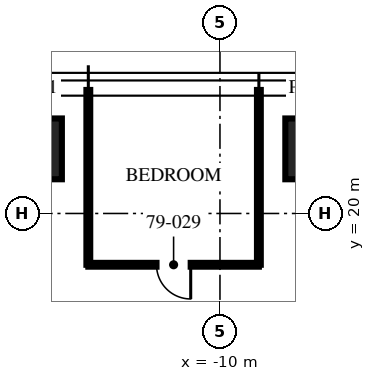
"""IFC4 building model, lengths in metres.
Left out: names, types, materials, properties, quantities, classifications, styles, units other than length and angle.
Written with IfcOpenShell. Run it as: python <this file> out.ifc"""

import sys

from ifc_helpers import new_model, si_unit, direction, frame, frame_2d, origin, origin_2d, place, context, subcontext, project, spatial, rectangle, extrude, element, fill, save


model = new_model("IFC4")
c1 = context("Model", 3, precision=1e-05, world=origin(), true_north=direction((0.0, 1.0)))
c2 = subcontext(c1, "Body", "Model", "MODEL_VIEW")
j1 = project(units=[si_unit("LENGTHUNIT", "METRE"), si_unit("PLANEANGLEUNIT", "RADIAN")], contexts=[c1])
p1 = place(None, origin())
s1 = spatial("IfcSite", under=j1, at=p1, CompositionType="ELEMENT")
p2 = place(p1, origin())
s2 = spatial("IfcBuilding", under=s1, at=p2, CompositionType="ELEMENT")
p3 = place(p2, frame((0.0, 0.0, 315.75)))
s3 = spatial("IfcBuildingStorey", under=s2, at=p3, CompositionType="ELEMENT", Elevation=315.75)
for number, where, z_axis, x_axis in (
    (1, (-14.96, 21.7, 0.0), (0.0, 0.0, 1.0), (1.0, 0.0, 0.0)),
    (2, (-7.48, 21.7, 0.0), (0.0, 0.0, 1.0), (1.0, 0.0, 0.0)),
):
    element("IfcColumn", number, at=place(p3, frame(where, z_axis=z_axis, x_axis=x_axis)), inside=s3, PredefinedType="COLUMN", context=c2, shape_type="SweptSolid", body=[
        extrude(rectangle(XDim=1.6, YDim=1.6, at=origin_2d()), origin(), (0.0, 0.0, 1.0), 3.75),
    ])
for number, where, z_axis, x_axis in (
    (3, (-8.976, 18.65, 0.0), (0.0, 0.0, 1.0), (0.0, 1.0, 0.0)),
    (4, (-13.464, 18.65, 0.0), (0.0, 0.0, 1.0), (0.0, 1.0, 0.0)),
):
    element("IfcWall", number, at=place(p3, frame(where, z_axis=z_axis, x_axis=x_axis)), inside=s3, PredefinedType="PARTITIONING", context=c2, shape_type="SweptSolid", body=[
        extrude(rectangle(XDim=4.6, YDim=0.1, at=frame_2d((2.3, 0.0))), origin(), (0.0, 0.0, 1.0), 3.01),
    ])
p4 = place(p3, frame((-8.976, 18.65, 0.0), z_axis=(0.0, 0.0, 1.0), x_axis=(-1.0, 0.0, 0.0)))
e5 = element("IfcWall", 5, at=p4, inside=s3, PredefinedType="PARTITIONING", context=c2, shape_type="SweptSolid", body=[
    extrude(rectangle(XDim=4.488, YDim=0.1, at=frame_2d((2.244, 0.0))), origin(), (0.0, 0.0, 1.0), 2.91),
])
p5 = place(p4, frame((1.794, 0.0, 0.0)))
e6 = element("IfcOpeningElement", 6, at=p5, cuts=e5, PredefinedType="OPENING", context=c2, shape_type="SweptSolid", body=[
    extrude(rectangle(XDim=0.9, YDim=2.1, at=frame_2d((0.45, 1.05))), frame((0.0, 0.06, 0.0), z_axis=(0.0, -1.0, 0.0), x_axis=(1.0, 0.0, 0.0)), (0.0, 0.0, 1.0), 0.12),
])
p6 = place(p5, origin())
e7 = element("IfcDoor", 7, at=p6, inside=s3, OperationType="SINGLE_SWING_LEFT", PredefinedType="DOOR", context=c2, shape_type="SweptSolid", body=[
    extrude(rectangle(XDim=0.9, YDim=2.1, at=frame_2d((0.45, 1.05))), frame((0.0, 0.025, 0.0), z_axis=(0.0, -1.0, 0.0), x_axis=(1.0, 0.0, 0.0)), (0.0, 0.0, 1.0), 0.05),
])
fill(e6, e7)
save(model, sys.argv[1])
